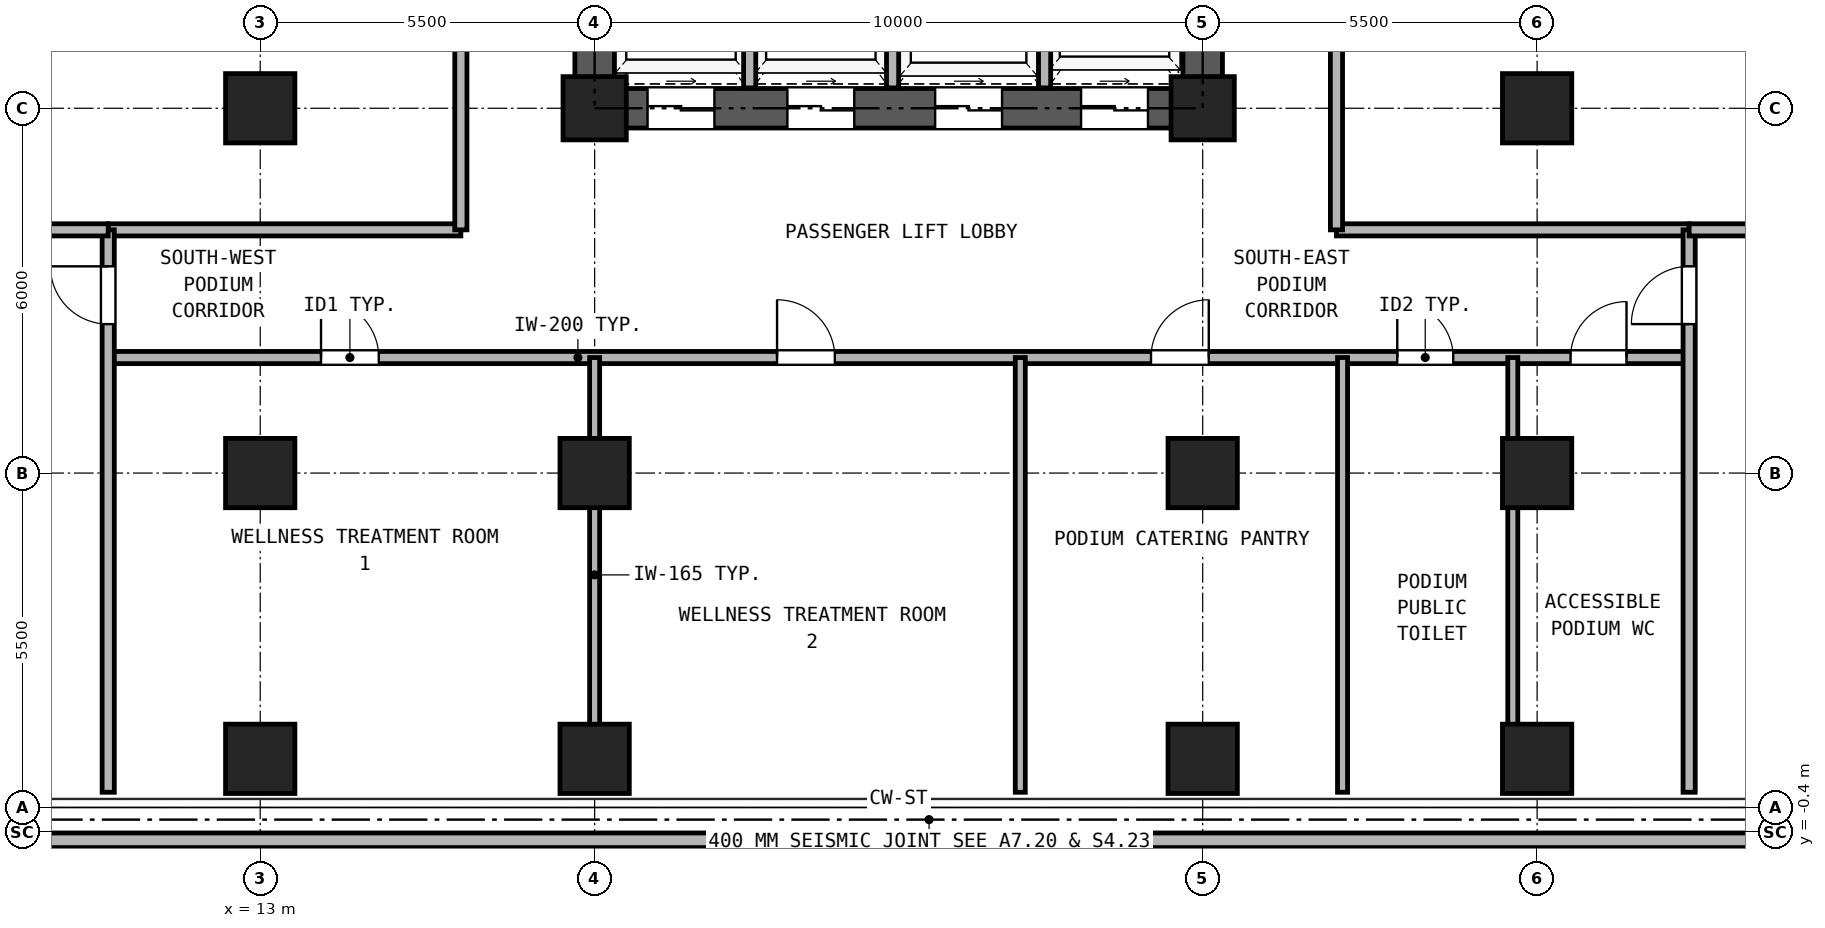
"""IFC4 building model, lengths in metres.
Left out: names, types, materials, properties, quantities, classifications, styles, units other than length and angle.
Written with IfcOpenShell. Run it as: python <this file> out.ifc"""

import sys

from ifc_helpers import new_model, si_unit, direction, frame, frame_2d, origin, origin_2d, place, context, subcontext, project, spatial, rectangle, hollow_rectangle, extrude, source, transform, mapped, element, fill, save


model = new_model("IFC4")
c1 = context("Model", 3, precision=1e-05, world=origin(), true_north=direction((0.0, 1.0)))
c2 = subcontext(c1, "Body", "Model", "MODEL_VIEW")
j1 = project(units=[si_unit("LENGTHUNIT", "METRE"), si_unit("PLANEANGLEUNIT", "RADIAN")], contexts=[c1])
p1 = place(None, origin())
s1 = spatial("IfcSite", under=j1, at=p1, CompositionType="ELEMENT")
p2 = place(p1, origin())
s2 = spatial("IfcBuilding", under=s1, at=p2, CompositionType="ELEMENT")
p3 = place(p2, frame((0.0, 0.0, 18.0)))
s3 = spatial("IfcBuildingStorey", under=s2, at=p3, CompositionType="ELEMENT", Elevation=18.0)
m1 = source(origin(), c2, "Body", "SweptSolid", [
    extrude(hollow_rectangle(XDim=1.14, YDim=1.14, WallThickness=0.07, at=origin_2d()), origin(), (0.0, 0.0, 1.0), 4.14),
])
for number, where, z_axis, x_axis in (
    (1, (13.0, 0.8, 0.0), (0.0, 0.0, 1.0), (1.0, 0.0, 0.0)),
    (2, (18.5, 0.8, 0.0), (0.0, 0.0, 1.0), (1.0, 0.0, 0.0)),
    (3, (28.5, 0.8, 0.0), (0.0, 0.0, 1.0), (1.0, 0.0, 0.0)),
    (4, (34.0, 0.8, 0.0), (0.0, 0.0, 1.0), (1.0, 0.0, 0.0)),
    (5, (13.0, 5.5, 0.0), (0.0, 0.0, 1.0), (1.0, 0.0, 0.0)),
    (6, (13.0, 11.5, 0.0), (0.0, 0.0, 1.0), (1.0, 0.0, 0.0)),
    (7, (18.5, 5.5, 0.0), (0.0, 0.0, 1.0), (1.0, 0.0, 0.0)),
):
    element("IfcColumn", number, at=place(p3, frame(where, z_axis=z_axis, x_axis=x_axis)), inside=s3, PredefinedType="COLUMN", context=c2, shape_type="MappedRepresentation", body=[
        mapped(m1, transform((0.0, 0.0, 0.0), x_axis=(1.0, 0.0, 0.0), y_axis=(0.0, 1.0, 0.0), z_axis=(0.0, 0.0, 1.0), scale=1.0)),
    ])
m2 = source(origin(), c2, "Body", "SweptSolid", [
    extrude(hollow_rectangle(XDim=1.04, YDim=1.04, WallThickness=0.065, at=origin_2d()), origin(), (0.0, 0.0, 1.0), 4.14),
])
p4 = place(p3, frame((18.5, 11.5, 0.0), z_axis=(0.0, 0.0, 1.0), x_axis=(1.0, 0.0, 0.0)))
e8 = element("IfcColumn", 8, at=p4, inside=s3, PredefinedType="COLUMN", context=c2, shape_type="MappedRepresentation", body=[
    mapped(m2, transform((0.0, 0.0, 0.0), x_axis=(1.0, 0.0, 0.0), y_axis=(0.0, 1.0, 0.0), z_axis=(0.0, 0.0, 1.0), scale=1.0)),
])
p5 = place(p3, frame((28.5, 5.5, 0.0), z_axis=(0.0, 0.0, 1.0), x_axis=(1.0, 0.0, 0.0)))
e9 = element("IfcColumn", 9, at=p5, inside=s3, PredefinedType="COLUMN", context=c2, shape_type="MappedRepresentation", body=[
    mapped(m1, transform((0.0, 0.0, 0.0), x_axis=(1.0, 0.0, 0.0), y_axis=(0.0, 1.0, 0.0), z_axis=(0.0, 0.0, 1.0), scale=1.0)),
])
p6 = place(p3, frame((28.5, 11.5, 0.0), z_axis=(0.0, 0.0, 1.0), x_axis=(1.0, 0.0, 0.0)))
e10 = element("IfcColumn", 10, at=p6, inside=s3, PredefinedType="COLUMN", context=c2, shape_type="MappedRepresentation", body=[
    mapped(m2, transform((0.0, 0.0, 0.0), x_axis=(1.0, 0.0, 0.0), y_axis=(0.0, 1.0, 0.0), z_axis=(0.0, 0.0, 1.0), scale=1.0)),
])
for number, where, z_axis, x_axis in (
    (11, (34.0, 5.5, 0.0), (0.0, 0.0, 1.0), (1.0, 0.0, 0.0)),
    (12, (34.0, 11.5, 0.0), (0.0, 0.0, 1.0), (1.0, 0.0, 0.0)),
):
    element("IfcColumn", number, at=place(p3, frame(where, z_axis=z_axis, x_axis=x_axis)), inside=s3, PredefinedType="COLUMN", context=c2, shape_type="MappedRepresentation", body=[
        mapped(m1, transform((0.0, 0.0, 0.0), x_axis=(1.0, 0.0, 0.0), y_axis=(0.0, 1.0, 0.0), z_axis=(0.0, 0.0, 1.0), scale=1.0)),
    ])
p7 = place(p3, frame((0.2, -0.54, 0.0), z_axis=(0.0, 0.0, 1.0), x_axis=(1.0, 0.0, 0.0)))
e13 = element("IfcWall", 13, at=p7, inside=s3, PredefinedType="SOLIDWALL", context=c2, shape_type="SweptSolid", body=[
    extrude(rectangle(XDim=47.34, YDim=0.24, at=frame_2d((23.67, 0.0))), origin(), (0.0, 0.0, 1.0), 4.2),
])
p8 = place(p3, frame((18.175, 11.5, 0.0), z_axis=(0.0, 0.0, 1.0), x_axis=(1.0, 0.0, 0.0)))
e14 = element("IfcWall", 14, at=p8, inside=s3, PredefinedType="SHEAR", context=c2, shape_type="SweptSolid", body=[
    extrude(rectangle(XDim=10.65, YDim=0.65, at=frame_2d((5.325, 0.0))), origin(), (0.0, 0.0, 1.0), 4.14),
])
p9 = place(p8, frame((1.195, 0.0, 0.0)))
e15 = element("IfcOpeningElement", 15, at=p9, cuts=e14, PredefinedType="OPENING", context=c2, shape_type="SweptSolid", body=[
    extrude(rectangle(XDim=1.1, YDim=2.25, at=frame_2d((0.55, 1.125))), frame((0.0, 0.335, 0.0), z_axis=(0.0, -1.0, 0.0), x_axis=(1.0, 0.0, 0.0)), (0.0, 0.0, 1.0), 0.67),
])
p10 = place(p8, frame((3.495, 0.0, 0.0)))
e16 = element("IfcOpeningElement", 16, at=p10, cuts=e14, PredefinedType="OPENING", context=c2, shape_type="SweptSolid", body=[
    extrude(rectangle(XDim=1.1, YDim=2.25, at=frame_2d((0.55, 1.125))), frame((0.0, 0.335, 0.0), z_axis=(0.0, -1.0, 0.0), x_axis=(1.0, 0.0, 0.0)), (0.0, 0.0, 1.0), 0.67),
])
p11 = place(p8, frame((5.925, 0.0, 0.0)))
e17 = element("IfcOpeningElement", 17, at=p11, cuts=e14, PredefinedType="OPENING", context=c2, shape_type="SweptSolid", body=[
    extrude(rectangle(XDim=1.1, YDim=2.25, at=frame_2d((0.55, 1.125))), frame((0.0, 0.335, 0.0), z_axis=(0.0, -1.0, 0.0), x_axis=(1.0, 0.0, 0.0)), (0.0, 0.0, 1.0), 0.67),
])
p12 = place(p8, frame((8.325, 0.0, 0.0)))
e18 = element("IfcOpeningElement", 18, at=p12, cuts=e14, PredefinedType="OPENING", context=c2, shape_type="SweptSolid", body=[
    extrude(rectangle(XDim=1.1, YDim=2.25, at=frame_2d((0.55, 1.125))), frame((0.0, 0.335, 0.0), z_axis=(0.0, -1.0, 0.0), x_axis=(1.0, 0.0, 0.0)), (0.0, 0.0, 1.0), 0.67),
])
p13 = place(p3, frame((18.5, 11.825, 0.0), z_axis=(0.0, 0.0, 1.0), x_axis=(0.0, 1.0, 0.0)))
e19 = element("IfcWall", 19, at=p13, inside=s3, PredefinedType="SHEAR", context=c2, shape_type="SweptSolid", body=[
    extrude(rectangle(XDim=16.6, YDim=0.65, at=frame_2d((8.3, 0.0))), origin(), (0.0, 0.0, 1.0), 4.14),
])
p14 = place(p13, frame((7.325, 0.0, 0.0)))
e20 = element("IfcOpeningElement", 20, at=p14, cuts=e19, PredefinedType="OPENING", context=c2, shape_type="SweptSolid", body=[
    extrude(rectangle(XDim=1.15, YDim=2.2, at=frame_2d((0.575, 1.1))), frame((0.0, 0.335, 0.0), z_axis=(0.0, -1.0, 0.0), x_axis=(1.0, 0.0, 0.0)), (0.0, 0.0, 1.0), 0.67),
])
p15 = place(p3, frame((28.5, 11.825, 0.0), z_axis=(0.0, 0.0, 1.0), x_axis=(0.0, 1.0, 0.0)))
e21 = element("IfcWall", 21, at=p15, inside=s3, PredefinedType="SHEAR", context=c2, shape_type="SweptSolid", body=[
    extrude(rectangle(XDim=16.6, YDim=0.65, at=frame_2d((8.3, 0.0))), origin(), (0.0, 0.0, 1.0), 4.14),
])
p16 = place(p15, frame((7.325, 0.0, 0.0)))
e22 = element("IfcOpeningElement", 22, at=p16, cuts=e21, PredefinedType="OPENING", context=c2, shape_type="SweptSolid", body=[
    extrude(rectangle(XDim=1.15, YDim=2.2, at=frame_2d((0.575, 1.1))), frame((0.0, 0.335, 0.0), z_axis=(0.0, -1.0, 0.0), x_axis=(1.0, 0.0, 0.0)), (0.0, 0.0, 1.0), 0.67),
])
for number, where, z_axis, x_axis in (
    (23, (21.05, 11.835, 0.0), (0.0, 0.0, 1.0), (0.0, 1.0, 0.0)),
    (24, (23.4, 11.835, 0.0), (0.0, 0.0, 1.0), (0.0, 1.0, 0.0)),
    (25, (25.9, 11.835, 0.0), (0.0, 0.0, 1.0), (0.0, 1.0, 0.0)),
):
    element("IfcWall", number, at=place(p3, frame(where, z_axis=z_axis, x_axis=x_axis)), inside=s3, PredefinedType="PARTITIONING", context=c2, shape_type="SweptSolid", body=[
        extrude(rectangle(XDim=3.165, YDim=0.2, at=frame_2d((1.583, 0.0))), origin(), (0.0, 0.0, 1.0), 4.14),
    ])
p17 = place(p3, frame((10.5, 7.4, 0.0), z_axis=(0.0, 0.0, 1.0), x_axis=(1.0, 0.0, 0.0)))
e26 = element("IfcWall", 26, at=p17, inside=s3, PredefinedType="PARTITIONING", context=c2, shape_type="SweptSolid", body=[
    extrude(rectangle(XDim=26.0, YDim=0.2, at=frame_2d((13.0, 0.0))), origin(), (0.0, 0.0, 1.0), 4.14),
])
p18 = place(p17, frame((3.5, 0.0, 0.0)))
e27 = element("IfcOpeningElement", 27, at=p18, cuts=e26, PredefinedType="OPENING", context=c2, shape_type="SweptSolid", body=[
    extrude(rectangle(XDim=0.95, YDim=2.15, at=frame_2d((0.475, 1.075))), frame((0.0, 0.11, 0.0), z_axis=(0.0, -1.0, 0.0), x_axis=(1.0, 0.0, 0.0)), (0.0, 0.0, 1.0), 0.22),
])
p19 = place(p17, frame((11.0, 0.0, 0.0)))
e28 = element("IfcOpeningElement", 28, at=p19, cuts=e26, PredefinedType="OPENING", context=c2, shape_type="SweptSolid", body=[
    extrude(rectangle(XDim=0.95, YDim=2.15, at=frame_2d((0.475, 1.075))), frame((0.0, 0.11, 0.0), z_axis=(0.0, -1.0, 0.0), x_axis=(1.0, 0.0, 0.0)), (0.0, 0.0, 1.0), 0.22),
])
p20 = place(p17, frame((17.15, 0.0, 0.0)))
e29 = element("IfcOpeningElement", 29, at=p20, cuts=e26, PredefinedType="OPENING", context=c2, shape_type="SweptSolid", body=[
    extrude(rectangle(XDim=0.95, YDim=2.15, at=frame_2d((0.475, 1.075))), frame((0.0, 0.11, 0.0), z_axis=(0.0, -1.0, 0.0), x_axis=(1.0, 0.0, 0.0)), (0.0, 0.0, 1.0), 0.22),
])
p21 = place(p17, frame((21.2, 0.0, 0.0)))
e30 = element("IfcOpeningElement", 30, at=p21, cuts=e26, PredefinedType="OPENING", context=c2, shape_type="SweptSolid", body=[
    extrude(rectangle(XDim=0.92, YDim=2.1, at=frame_2d((0.46, 1.05))), frame((0.0, 0.11, 0.0), z_axis=(0.0, -1.0, 0.0), x_axis=(1.0, 0.0, 0.0)), (0.0, 0.0, 1.0), 0.22),
])
p22 = place(p17, frame((24.05, 0.0, 0.0)))
e31 = element("IfcOpeningElement", 31, at=p22, cuts=e26, PredefinedType="OPENING", context=c2, shape_type="SweptSolid", body=[
    extrude(rectangle(XDim=0.92, YDim=2.1, at=frame_2d((0.46, 1.05))), frame((0.0, 0.11, 0.0), z_axis=(0.0, -1.0, 0.0), x_axis=(1.0, 0.0, 0.0)), (0.0, 0.0, 1.0), 0.22),
])
for number, where, z_axis, x_axis in (
    (32, (10.5, 9.5, 0.0), (0.0, 0.0, 1.0), (1.0, 0.0, 0.0)),
    (33, (30.7, 9.5, 0.0), (0.0, 0.0, 1.0), (1.0, 0.0, 0.0)),
):
    element("IfcWall", number, at=place(p3, frame(where, z_axis=z_axis, x_axis=x_axis)), inside=s3, PredefinedType="PARTITIONING", context=c2, shape_type="SweptSolid", body=[
        extrude(rectangle(XDim=5.8, YDim=0.2, at=frame_2d((2.9, 0.0))), origin(), (0.0, 0.0, 1.0), 4.14),
    ])
p23 = place(p3, frame((16.3, 9.5, 0.0), z_axis=(0.0, 0.0, 1.0), x_axis=(0.0, 1.0, 0.0)))
e34 = element("IfcWall", 34, at=p23, inside=s3, PredefinedType="PARTITIONING", context=c2, shape_type="SweptSolid", body=[
    extrude(rectangle(XDim=20.7, YDim=0.2, at=frame_2d((10.35, 0.0))), origin(), (0.0, 0.0, 1.0), 4.14),
])
p24 = place(p23, frame((5.0, 0.0, 0.0)))
e35 = element("IfcOpeningElement", 35, at=p24, cuts=e34, PredefinedType="OPENING", context=c2, shape_type="SweptSolid", body=[
    extrude(rectangle(XDim=0.95, YDim=2.15, at=frame_2d((0.475, 1.075))), frame((0.0, 0.11, 0.0), z_axis=(0.0, -1.0, 0.0), x_axis=(1.0, 0.0, 0.0)), (0.0, 0.0, 1.0), 0.22),
])
p25 = place(p23, frame((15.35, 0.0, 0.0)))
e36 = element("IfcOpeningElement", 36, at=p25, cuts=e34, PredefinedType="OPENING", context=c2, shape_type="SweptSolid", body=[
    extrude(rectangle(XDim=0.95, YDim=2.15, at=frame_2d((0.475, 1.075))), frame((0.0, 0.11, 0.0), z_axis=(0.0, -1.0, 0.0), x_axis=(1.0, 0.0, 0.0)), (0.0, 0.0, 1.0), 0.22),
])
p26 = place(p3, frame((30.7, 9.5, 0.0), z_axis=(0.0, 0.0, 1.0), x_axis=(0.0, 1.0, 0.0)))
e37 = element("IfcWall", 37, at=p26, inside=s3, PredefinedType="PARTITIONING", context=c2, shape_type="SweptSolid", body=[
    extrude(rectangle(XDim=20.7, YDim=0.2, at=frame_2d((10.35, 0.0))), origin(), (0.0, 0.0, 1.0), 4.14),
])
p27 = place(p26, frame((9.85, 0.0, 0.0)))
e38 = element("IfcOpeningElement", 38, at=p27, cuts=e37, PredefinedType="OPENING", context=c2, shape_type="SweptSolid", body=[
    extrude(rectangle(XDim=0.95, YDim=2.15, at=frame_2d((0.475, 1.075))), frame((0.0, 0.11, 0.0), z_axis=(0.0, -1.0, 0.0), x_axis=(1.0, 0.0, 0.0)), (0.0, 0.0, 1.0), 0.22),
])
p28 = place(p3, frame((10.5, 0.25, 0.0), z_axis=(0.0, 0.0, 1.0), x_axis=(0.0, 1.0, 0.0)))
e39 = element("IfcWall", 39, at=p28, inside=s3, PredefinedType="PARTITIONING", context=c2, shape_type="SweptSolid", body=[
    extrude(rectangle(XDim=9.25, YDim=0.2, at=frame_2d((4.625, 0.0))), origin(), (0.0, 0.0, 1.0), 4.14),
])
p29 = place(p28, frame((7.7, 0.0, 0.0)))
e40 = element("IfcOpeningElement", 40, at=p29, cuts=e39, PredefinedType="OPENING", context=c2, shape_type="SweptSolid", body=[
    extrude(rectangle(XDim=0.95, YDim=2.15, at=frame_2d((0.475, 1.075))), frame((0.0, 0.11, 0.0), z_axis=(0.0, -1.0, 0.0), x_axis=(1.0, 0.0, 0.0)), (0.0, 0.0, 1.0), 0.22),
])
p30 = place(p3, frame((36.5, 0.25, 0.0), z_axis=(0.0, 0.0, 1.0), x_axis=(0.0, 1.0, 0.0)))
e41 = element("IfcWall", 41, at=p30, inside=s3, PredefinedType="PARTITIONING", context=c2, shape_type="SweptSolid", body=[
    extrude(rectangle(XDim=9.25, YDim=0.2, at=frame_2d((4.625, 0.0))), origin(), (0.0, 0.0, 1.0), 4.14),
])
p31 = place(p30, frame((7.7, 0.0, 0.0)))
e42 = element("IfcOpeningElement", 42, at=p31, cuts=e41, PredefinedType="OPENING", context=c2, shape_type="SweptSolid", body=[
    extrude(rectangle(XDim=0.95, YDim=2.15, at=frame_2d((0.475, 1.075))), frame((0.0, 0.11, 0.0), z_axis=(0.0, -1.0, 0.0), x_axis=(1.0, 0.0, 0.0)), (0.0, 0.0, 1.0), 0.22),
])
for number, where, z_axis, x_axis in (
    (43, (0.25, 9.5, 0.0), (0.0, 0.0, 1.0), (1.0, 0.0, 0.0)),
    (44, (36.5, 9.5, 0.0), (0.0, 0.0, 1.0), (1.0, 0.0, 0.0)),
):
    element("IfcWall", number, at=place(p3, frame(where, z_axis=z_axis, x_axis=x_axis)), inside=s3, PredefinedType="PARTITIONING", context=c2, shape_type="SweptSolid", body=[
        extrude(rectangle(XDim=10.25, YDim=0.2, at=frame_2d((5.125, 0.0))), origin(), (0.0, 0.0, 1.0), 4.14),
    ])
p32 = place(p3, frame((18.5, 0.25, 0.0), z_axis=(0.0, 0.0, 1.0), x_axis=(0.0, 1.0, 0.0)))
e45 = element("IfcWall", 45, at=p32, inside=s3, PredefinedType="PARTITIONING", context=c2, shape_type="SweptSolid", body=[
    extrude(rectangle(XDim=7.15, YDim=0.165, at=frame_2d((3.575, 0.0))), origin(), (0.0, 0.0, 1.0), 3.213),
])
for number, where, z_axis, x_axis in (
    (46, (25.5, 0.25, 0.0), (0.0, 0.0, 1.0), (0.0, 1.0, 0.0)),
    (47, (30.8, 0.25, 0.0), (0.0, 0.0, 1.0), (0.0, 1.0, 0.0)),
    (48, (33.6, 0.25, 0.0), (0.0, 0.0, 1.0), (0.0, 1.0, 0.0)),
):
    element("IfcWall", number, at=place(p3, frame(where, z_axis=z_axis, x_axis=x_axis)), inside=s3, PredefinedType="PARTITIONING", context=c2, shape_type="SweptSolid", body=[
        extrude(rectangle(XDim=7.15, YDim=0.165, at=frame_2d((3.575, 0.0))), origin(), (0.0, 0.0, 1.0), 4.14),
    ])
p33 = place(p9, frame((1.1, 0.0, 0.0), z_axis=(0.0, 0.0, 1.0), x_axis=(-1.0, 0.0, 0.0)))
e49 = element("IfcDoor", 49, at=p33, inside=s3, OperationType="DOUBLE_DOOR_SLIDING", PredefinedType="DOOR", context=c2, shape_type="SweptSolid", body=[
    extrude(rectangle(XDim=1.1, YDim=2.25, at=frame_2d((0.55, 1.125))), frame((0.0, 0.025, 0.0), z_axis=(0.0, -1.0, 0.0), x_axis=(1.0, 0.0, 0.0)), (0.0, 0.0, 1.0), 0.05),
])
fill(e15, e49)
p34 = place(p10, frame((1.1, 0.0, 0.0), z_axis=(0.0, 0.0, 1.0), x_axis=(-1.0, 0.0, 0.0)))
e50 = element("IfcDoor", 50, at=p34, inside=s3, OperationType="DOUBLE_DOOR_SLIDING", PredefinedType="DOOR", context=c2, shape_type="SweptSolid", body=[
    extrude(rectangle(XDim=1.1, YDim=2.25, at=frame_2d((0.55, 1.125))), frame((0.0, 0.025, 0.0), z_axis=(0.0, -1.0, 0.0), x_axis=(1.0, 0.0, 0.0)), (0.0, 0.0, 1.0), 0.05),
])
fill(e16, e50)
p35 = place(p11, frame((1.1, 0.0, 0.0), z_axis=(0.0, 0.0, 1.0), x_axis=(-1.0, 0.0, 0.0)))
e51 = element("IfcDoor", 51, at=p35, inside=s3, OperationType="DOUBLE_DOOR_SLIDING", PredefinedType="DOOR", context=c2, shape_type="SweptSolid", body=[
    extrude(rectangle(XDim=1.1, YDim=2.25, at=frame_2d((0.55, 1.125))), frame((0.0, 0.025, 0.0), z_axis=(0.0, -1.0, 0.0), x_axis=(1.0, 0.0, 0.0)), (0.0, 0.0, 1.0), 0.05),
])
fill(e17, e51)
p36 = place(p12, frame((1.1, 0.0, 0.0), z_axis=(0.0, 0.0, 1.0), x_axis=(-1.0, 0.0, 0.0)))
e52 = element("IfcDoor", 52, at=p36, inside=s3, OperationType="DOUBLE_DOOR_SLIDING", PredefinedType="DOOR", context=c2, shape_type="SweptSolid", body=[
    extrude(rectangle(XDim=1.1, YDim=2.25, at=frame_2d((0.55, 1.125))), frame((0.0, 0.025, 0.0), z_axis=(0.0, -1.0, 0.0), x_axis=(1.0, 0.0, 0.0)), (0.0, 0.0, 1.0), 0.05),
])
fill(e18, e52)
p37 = place(p18, frame((0.95, 0.0, 0.0), z_axis=(0.0, 0.0, 1.0), x_axis=(-1.0, 0.0, 0.0)))
e53 = element("IfcDoor", 53, at=p37, inside=s3, OperationType="SINGLE_SWING_LEFT", PredefinedType="DOOR", context=c2, shape_type="SweptSolid", body=[
    extrude(rectangle(XDim=0.95, YDim=2.15, at=frame_2d((0.475, 1.075))), frame((0.0, 0.025, 0.0), z_axis=(0.0, -1.0, 0.0), x_axis=(1.0, 0.0, 0.0)), (0.0, 0.0, 1.0), 0.05),
])
fill(e27, e53)
p38 = place(p19, frame((0.95, 0.0, 0.0), z_axis=(0.0, 0.0, 1.0), x_axis=(-1.0, 0.0, 0.0)))
e54 = element("IfcDoor", 54, at=p38, inside=s3, OperationType="SINGLE_SWING_LEFT", PredefinedType="DOOR", context=c2, shape_type="SweptSolid", body=[
    extrude(rectangle(XDim=0.95, YDim=2.15, at=frame_2d((0.475, 1.075))), frame((0.0, 0.025, 0.0), z_axis=(0.0, -1.0, 0.0), x_axis=(1.0, 0.0, 0.0)), (0.0, 0.0, 1.0), 0.05),
])
fill(e28, e54)
p39 = place(p20, frame((0.95, 0.0, 0.0), z_axis=(0.0, 0.0, 1.0), x_axis=(-1.0, 0.0, 0.0)))
e55 = element("IfcDoor", 55, at=p39, inside=s3, OperationType="SINGLE_SWING_RIGHT", PredefinedType="DOOR", context=c2, shape_type="SweptSolid", body=[
    extrude(rectangle(XDim=0.95, YDim=2.15, at=frame_2d((0.475, 1.075))), frame((0.0, 0.025, 0.0), z_axis=(0.0, -1.0, 0.0), x_axis=(1.0, 0.0, 0.0)), (0.0, 0.0, 1.0), 0.05),
])
fill(e29, e55)
p40 = place(p21, frame((0.92, 0.0, 0.0), z_axis=(0.0, 0.0, 1.0), x_axis=(-1.0, 0.0, 0.0)))
e56 = element("IfcDoor", 56, at=p40, inside=s3, OperationType="SINGLE_SWING_LEFT", PredefinedType="DOOR", context=c2, shape_type="SweptSolid", body=[
    extrude(rectangle(XDim=0.92, YDim=2.1, at=frame_2d((0.46, 1.05))), frame((0.0, 0.025, 0.0), z_axis=(0.0, -1.0, 0.0), x_axis=(1.0, 0.0, 0.0)), (0.0, 0.0, 1.0), 0.05),
])
fill(e30, e56)
p41 = place(p22, frame((0.92, 0.0, 0.0), z_axis=(0.0, 0.0, 1.0), x_axis=(-1.0, 0.0, 0.0)))
e57 = element("IfcDoor", 57, at=p41, inside=s3, OperationType="SINGLE_SWING_RIGHT", PredefinedType="DOOR", context=c2, shape_type="SweptSolid", body=[
    extrude(rectangle(XDim=0.92, YDim=2.1, at=frame_2d((0.46, 1.05))), frame((0.0, 0.025, 0.0), z_axis=(0.0, -1.0, 0.0), x_axis=(1.0, 0.0, 0.0)), (0.0, 0.0, 1.0), 0.05),
])
fill(e31, e57)
p42 = place(p29, frame((0.95, 0.0, 0.0), z_axis=(0.0, 0.0, 1.0), x_axis=(-1.0, 0.0, 0.0)))
e58 = element("IfcDoor", 58, at=p42, inside=s3, OperationType="SINGLE_SWING_RIGHT", PredefinedType="DOOR", context=c2, shape_type="SweptSolid", body=[
    extrude(rectangle(XDim=0.95, YDim=2.15, at=frame_2d((0.475, 1.075))), frame((0.0, 0.025, 0.0), z_axis=(0.0, -1.0, 0.0), x_axis=(1.0, 0.0, 0.0)), (0.0, 0.0, 1.0), 0.05),
])
fill(e40, e58)
p43 = place(p31, origin())
e59 = element("IfcDoor", 59, at=p43, inside=s3, OperationType="SINGLE_SWING_LEFT", PredefinedType="DOOR", context=c2, shape_type="SweptSolid", body=[
    extrude(rectangle(XDim=0.95, YDim=2.15, at=frame_2d((0.475, 1.075))), frame((0.0, 0.025, 0.0), z_axis=(0.0, -1.0, 0.0), x_axis=(1.0, 0.0, 0.0)), (0.0, 0.0, 1.0), 0.05),
])
fill(e42, e59)
save(model, sys.argv[1])
